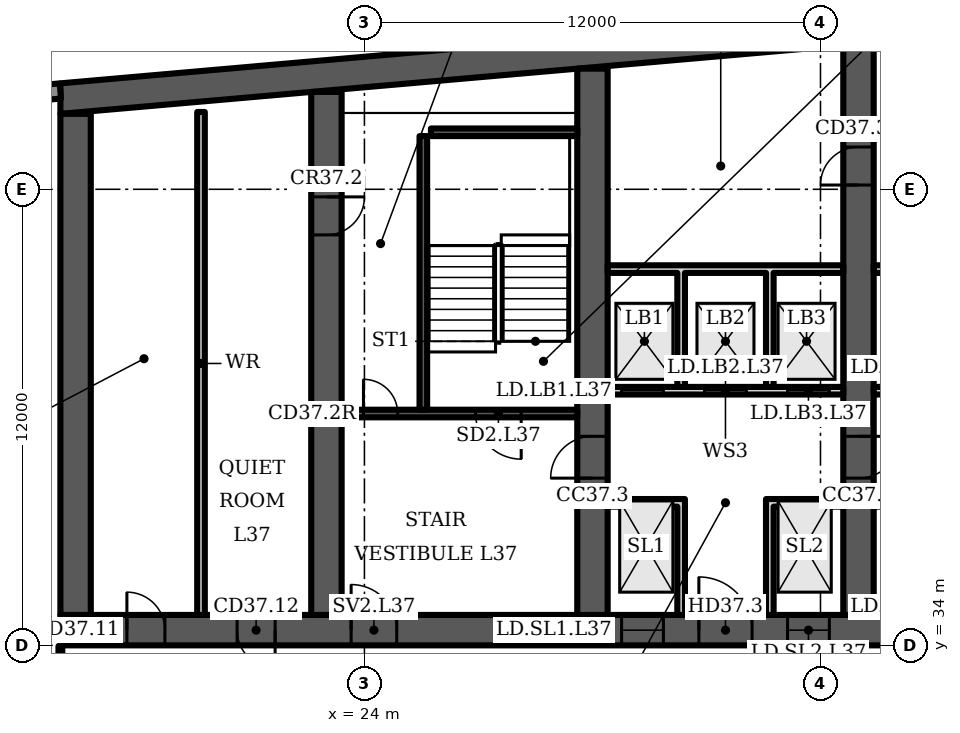
"""IFC4 building model, lengths in metres.
Left out: names, types, materials, properties, quantities, classifications, styles, units other than length and angle.
Written with IfcOpenShell. Run it as: python <this file> out.ifc"""

import sys

from ifc_helpers import new_model, si_unit, direction, frame, frame_2d, origin, place, context, subcontext, project, spatial, polyline, rectangle, outline, extrude, element, fill, save


model = new_model("IFC4")
c1 = context("Model", 3, precision=1e-05, world=origin(), true_north=direction((0.0, 1.0)))
c2 = subcontext(c1, "Body", "Model", "MODEL_VIEW")
j1 = project(units=[si_unit("LENGTHUNIT", "METRE"), si_unit("PLANEANGLEUNIT", "RADIAN")], contexts=[c1])
p1 = place(None, origin())
s1 = spatial("IfcSite", under=j1, at=p1, CompositionType="ELEMENT")
p2 = place(p1, origin())
s2 = spatial("IfcBuilding", under=s1, at=p2, CompositionType="ELEMENT")
p3 = place(p2, frame((0.0, 0.0, 155.5)))
s3 = spatial("IfcBuildingStorey", under=s2, at=p3, CompositionType="ELEMENT", Elevation=155.5)
p4 = place(p3, origin())
e1 = element("IfcWall", 1, at=p4, inside=s3, PredefinedType="SHEAR", context=c2, shape_type="SweptSolid", body=[
    extrude(outline(polyline([(16.0, 47.984), (37.0, 49.822), (58.0, 47.984), (58.0, 48.787), (37.0, 50.625), (16.0, 48.787), (16.0, 47.984)])), origin(), (0.0, 0.0, 1.0), 3.6),
])
p5 = place(p3, frame((16.0, 34.4, 0.0), z_axis=(0.0, 0.0, 1.0), x_axis=(1.0, 0.0, 0.0)))
e2 = element("IfcWall", 2, at=p5, inside=s3, PredefinedType="SHEAR", context=c2, shape_type="SweptSolid", body=[
    extrude(rectangle(XDim=42.0, YDim=0.8, at=frame_2d((21.0, 0.0))), origin(), (0.0, 0.0, 1.0), 3.6),
])
p6 = place(p5, frame((1.75, 0.0, 0.0)))
e3 = element("IfcOpeningElement", 3, at=p6, cuts=e2, PredefinedType="OPENING", context=c2, shape_type="SweptSolid", body=[
    extrude(rectangle(XDim=1.0, YDim=2.1, at=frame_2d((0.5, 1.05))), frame((0.0, 0.41, 0.0), z_axis=(0.0, -1.0, 0.0), x_axis=(1.0, 0.0, 0.0)), (0.0, 0.0, 1.0), 0.82),
])
p7 = place(p5, frame((4.65, 0.0, 0.0)))
e4 = element("IfcOpeningElement", 4, at=p7, cuts=e2, PredefinedType="OPENING", context=c2, shape_type="SweptSolid", body=[
    extrude(rectangle(XDim=1.0, YDim=2.1, at=frame_2d((0.5, 1.05))), frame((0.0, 0.41, 0.0), z_axis=(0.0, -1.0, 0.0), x_axis=(1.0, 0.0, 0.0)), (0.0, 0.0, 1.0), 0.82),
])
p8 = place(p5, frame((7.65, 0.0, 0.0)))
e5 = element("IfcOpeningElement", 5, at=p8, cuts=e2, PredefinedType="OPENING", context=c2, shape_type="SweptSolid", body=[
    extrude(rectangle(XDim=1.2, YDim=2.1, at=frame_2d((0.6, 1.05))), frame((0.0, 0.41, 0.0), z_axis=(0.0, -1.0, 0.0), x_axis=(1.0, 0.0, 0.0)), (0.0, 0.0, 1.0), 0.82),
])
p9 = place(p5, frame((14.767, 0.0, 0.0)))
e6 = element("IfcOpeningElement", 6, at=p9, cuts=e2, PredefinedType="OPENING", context=c2, shape_type="SweptSolid", body=[
    extrude(rectangle(XDim=1.1, YDim=2.1, at=frame_2d((0.55, 1.05))), frame((0.0, 0.41, 0.0), z_axis=(0.0, -1.0, 0.0), x_axis=(1.0, 0.0, 0.0)), (0.0, 0.0, 1.0), 0.82),
])
p10 = place(p5, frame((19.133, 0.0, 0.0)))
e7 = element("IfcOpeningElement", 7, at=p10, cuts=e2, PredefinedType="OPENING", context=c2, shape_type="SweptSolid", body=[
    extrude(rectangle(XDim=1.1, YDim=2.1, at=frame_2d((0.55, 1.05))), frame((0.0, 0.41, 0.0), z_axis=(0.0, -1.0, 0.0), x_axis=(1.0, 0.0, 0.0)), (0.0, 0.0, 1.0), 0.82),
])
p11 = place(p5, frame((16.8, 0.0, 0.0)))
e8 = element("IfcOpeningElement", 8, at=p11, cuts=e2, PredefinedType="OPENING", context=c2, shape_type="SweptSolid", body=[
    extrude(rectangle(XDim=1.4, YDim=2.1, at=frame_2d((0.7, 1.05))), frame((0.0, 0.41, 0.0), z_axis=(0.0, -1.0, 0.0), x_axis=(1.0, 0.0, 0.0)), (0.0, 0.0, 1.0), 0.82),
])
p12 = place(p5, frame((21.767, 0.0, 0.0)))
e9 = element("IfcOpeningElement", 9, at=p12, cuts=e2, PredefinedType="OPENING", context=c2, shape_type="SweptSolid", body=[
    extrude(rectangle(XDim=1.1, YDim=2.1, at=frame_2d((0.55, 1.05))), frame((0.0, 0.41, 0.0), z_axis=(0.0, -1.0, 0.0), x_axis=(1.0, 0.0, 0.0)), (0.0, 0.0, 1.0), 0.82),
])
p13 = place(p5, frame((23.95, 0.0, 0.0)))
e10 = element("IfcOpeningElement", 10, at=p13, cuts=e2, PredefinedType="OPENING", context=c2, shape_type="SweptSolid", body=[
    extrude(rectangle(XDim=1.1, YDim=2.1, at=frame_2d((0.55, 1.05))), frame((0.0, 0.41, 0.0), z_axis=(0.0, -1.0, 0.0), x_axis=(1.0, 0.0, 0.0)), (0.0, 0.0, 1.0), 0.82),
])
p14 = place(p5, frame((26.133, 0.0, 0.0)))
e11 = element("IfcOpeningElement", 11, at=p14, cuts=e2, PredefinedType="OPENING", context=c2, shape_type="SweptSolid", body=[
    extrude(rectangle(XDim=1.1, YDim=2.1, at=frame_2d((0.55, 1.05))), frame((0.0, 0.41, 0.0), z_axis=(0.0, -1.0, 0.0), x_axis=(1.0, 0.0, 0.0)), (0.0, 0.0, 1.0), 0.82),
])
p15 = place(p5, frame((33.15, 0.0, 0.0)))
e12 = element("IfcOpeningElement", 12, at=p15, cuts=e2, PredefinedType="OPENING", context=c2, shape_type="SweptSolid", body=[
    extrude(rectangle(XDim=1.2, YDim=2.1, at=frame_2d((0.6, 1.05))), frame((0.0, 0.41, 0.0), z_axis=(0.0, -1.0, 0.0), x_axis=(1.0, 0.0, 0.0)), (0.0, 0.0, 1.0), 0.82),
])
p16 = place(p5, frame((35.817, 0.0, 0.0)))
e13 = element("IfcOpeningElement", 13, at=p16, cuts=e2, PredefinedType="OPENING", context=c2, shape_type="SweptSolid", body=[
    extrude(rectangle(XDim=1.0, YDim=2.1, at=frame_2d((0.5, 1.05))), frame((0.0, 0.41, 0.0), z_axis=(0.0, -1.0, 0.0), x_axis=(1.0, 0.0, 0.0)), (0.0, 0.0, 1.0), 0.82),
])
p17 = place(p5, frame((39.95, 0.0, 0.0)))
e14 = element("IfcOpeningElement", 14, at=p17, cuts=e2, PredefinedType="OPENING", context=c2, shape_type="SweptSolid", body=[
    extrude(rectangle(XDim=1.0, YDim=2.1, at=frame_2d((0.5, 1.05))), frame((0.0, 0.41, 0.0), z_axis=(0.0, -1.0, 0.0), x_axis=(1.0, 0.0, 0.0)), (0.0, 0.0, 1.0), 0.82),
])
p18 = place(p5, frame((37.767, 0.0, 0.0)))
e15 = element("IfcOpeningElement", 15, at=p18, cuts=e2, PredefinedType="OPENING", context=c2, shape_type="SweptSolid", body=[
    extrude(rectangle(XDim=1.4, YDim=2.1, at=frame_2d((0.7, 1.05))), frame((0.0, 0.41, 0.0), z_axis=(0.0, -1.0, 0.0), x_axis=(1.0, 0.0, 0.0)), (0.0, 0.0, 1.0), 0.82),
])
p19 = place(p3, frame((16.4, 34.8, 0.0), z_axis=(0.0, 0.0, 1.0), x_axis=(0.0, 1.0, 0.0)))
e16 = element("IfcWall", 16, at=p19, inside=s3, PredefinedType="SHEAR", context=c2, shape_type="SweptSolid", body=[
    extrude(rectangle(XDim=13.184, YDim=0.8, at=frame_2d((6.592, 0.0))), origin(), (0.0, 0.0, 1.0), 3.6),
])
p20 = place(p3, frame((23.0, 34.8, 0.0), z_axis=(0.0, 0.0, 1.0), x_axis=(0.0, 1.0, 0.0)))
e17 = element("IfcWall", 17, at=p20, inside=s3, PredefinedType="SHEAR", context=c2, shape_type="SweptSolid", body=[
    extrude(rectangle(XDim=13.762, YDim=0.8, at=frame_2d((6.881, 0.0))), origin(), (0.0, 0.0, 1.0), 3.6),
])
p21 = place(p20, frame((10.0, 0.0, 0.0)))
e18 = element("IfcOpeningElement", 18, at=p21, cuts=e17, PredefinedType="OPENING", context=c2, shape_type="SweptSolid", body=[
    extrude(rectangle(XDim=1.0, YDim=2.1, at=frame_2d((0.5, 1.05))), frame((0.0, 0.41, 0.0), z_axis=(0.0, -1.0, 0.0), x_axis=(1.0, 0.0, 0.0)), (0.0, 0.0, 1.0), 0.82),
])
p22 = place(p3, frame((30.0, 34.8, 0.0), z_axis=(0.0, 0.0, 1.0), x_axis=(0.0, 1.0, 0.0)))
e19 = element("IfcWall", 19, at=p22, inside=s3, PredefinedType="SHEAR", context=c2, shape_type="SweptSolid", body=[
    extrude(rectangle(XDim=14.374, YDim=0.8, at=frame_2d((7.187, 0.0))), origin(), (0.0, 0.0, 1.0), 3.6),
])
p23 = place(p22, frame((3.6, 0.0, 0.0)))
e20 = element("IfcOpeningElement", 20, at=p23, cuts=e19, PredefinedType="OPENING", context=c2, shape_type="SweptSolid", body=[
    extrude(rectangle(XDim=1.1, YDim=2.1, at=frame_2d((0.55, 1.05))), frame((0.0, 0.41, 0.0), z_axis=(0.0, -1.0, 0.0), x_axis=(1.0, 0.0, 0.0)), (0.0, 0.0, 1.0), 0.82),
])
p24 = place(p3, frame((37.0, 34.8, 0.0), z_axis=(0.0, 0.0, 1.0), x_axis=(0.0, 1.0, 0.0)))
e21 = element("IfcWall", 21, at=p24, inside=s3, PredefinedType="SHEAR", context=c2, shape_type="SweptSolid", body=[
    extrude(rectangle(XDim=14.987, YDim=0.8, at=frame_2d((7.493, 0.0))), origin(), (0.0, 0.0, 1.0), 3.6),
])
p25 = place(p24, frame((11.312, 0.0, 0.0)))
e22 = element("IfcOpeningElement", 22, at=p25, cuts=e21, PredefinedType="OPENING", context=c2, shape_type="SweptSolid", body=[
    extrude(rectangle(XDim=1.0, YDim=2.1, at=frame_2d((0.5, 1.05))), frame((0.0, 0.41, 0.0), z_axis=(0.0, -1.0, 0.0), x_axis=(1.0, 0.0, 0.0)), (0.0, 0.0, 1.0), 0.82),
])
p26 = place(p24, frame((3.6, 0.0, 0.0)))
e23 = element("IfcOpeningElement", 23, at=p26, cuts=e21, PredefinedType="OPENING", context=c2, shape_type="SweptSolid", body=[
    extrude(rectangle(XDim=1.1, YDim=2.1, at=frame_2d((0.55, 1.05))), frame((0.0, 0.41, 0.0), z_axis=(0.0, -1.0, 0.0), x_axis=(1.0, 0.0, 0.0)), (0.0, 0.0, 1.0), 0.82),
])
p27 = place(p3, frame((16.0, 48.587, 0.0), z_axis=(0.0, 0.0, 1.0), x_axis=(-0.996194, -0.087168, 0.0)))
e24 = element("IfcWall", 24, at=p27, inside=s3, PredefinedType="SOLIDWALL", context=c2, shape_type="SweptSolid", body=[
    extrude(rectangle(XDim=2.994, YDim=0.4, at=frame_2d((1.497, 0.0))), origin(), (0.0, 0.0, 1.0), 3.2),
])
p28 = place(p3, frame((19.7, 34.8, 0.0), z_axis=(0.0, 0.0, 1.0), x_axis=(0.0, 1.0, 0.0)))
e25 = element("IfcWall", 25, at=p28, inside=s3, PredefinedType="PARTITIONING", context=c2, shape_type="SweptSolid", body=[
    extrude(rectangle(XDim=13.234, YDim=0.2, at=frame_2d((6.617, 0.0))), origin(), (0.0, 0.0, 1.0), 3.2),
])
p29 = place(p3, frame((23.4, 40.1, 0.0), z_axis=(0.0, 0.0, 1.0), x_axis=(1.0, 0.0, 0.0)))
e26 = element("IfcWall", 26, at=p29, inside=s3, PredefinedType="SHEAR", context=c2, shape_type="SweptSolid", body=[
    extrude(rectangle(XDim=6.2, YDim=0.2, at=frame_2d((3.1, 0.0))), origin(), (0.0, 0.0, 1.0), 3.2),
])
p30 = place(p29, frame((3.525, 0.0, 0.0)))
e27 = element("IfcOpeningElement", 27, at=p30, cuts=e26, PredefinedType="OPENING", context=c2, shape_type="SweptSolid", body=[
    extrude(rectangle(XDim=1.2, YDim=2.1, at=frame_2d((0.6, 1.05))), frame((0.0, 0.11, 0.0), z_axis=(0.0, -1.0, 0.0), x_axis=(1.0, 0.0, 0.0)), (0.0, 0.0, 1.0), 0.22),
])
p31 = place(p29, frame((0.575, 0.0, 0.0)))
e28 = element("IfcOpeningElement", 28, at=p31, cuts=e26, PredefinedType="OPENING", context=c2, shape_type="SweptSolid", body=[
    extrude(rectangle(XDim=0.9, YDim=2.1, at=frame_2d((0.45, 1.05))), frame((0.0, 0.11, 0.0), z_axis=(0.0, -1.0, 0.0), x_axis=(1.0, 0.0, 0.0)), (0.0, 0.0, 1.0), 0.22),
])
p32 = place(p3, frame((25.55, 40.2, 0.0), z_axis=(0.0, 0.0, 1.0), x_axis=(0.0, 1.0, 0.0)))
e29 = element("IfcWall", 29, at=p32, inside=s3, PredefinedType="SHEAR", context=c2, shape_type="SweptSolid", body=[
    extrude(rectangle(XDim=7.2, YDim=0.2, at=frame_2d((3.6, 0.0))), origin(), (0.0, 0.0, 1.0), 3.2),
])
p33 = place(p3, frame((25.75, 47.5, 0.0), z_axis=(0.0, 0.0, 1.0), x_axis=(1.0, 0.0, 0.0)))
e30 = element("IfcWall", 30, at=p33, inside=s3, PredefinedType="SHEAR", context=c2, shape_type="SweptSolid", body=[
    extrude(rectangle(XDim=3.85, YDim=0.2, at=frame_2d((1.925, 0.0))), origin(), (0.0, 0.0, 1.0), 3.2),
])
p34 = place(p3, frame((30.4, 40.7, 0.0), z_axis=(0.0, 0.0, 1.0), x_axis=(1.0, 0.0, 0.0)))
e31 = element("IfcWall", 31, at=p34, inside=s3, PredefinedType="PARTITIONING", context=c2, shape_type="SweptSolid", body=[
    extrude(rectangle(XDim=6.2, YDim=0.2, at=frame_2d((3.1, 0.0))), origin(), (0.0, 0.0, 1.0), 3.2),
])
p35 = place(p34, frame((0.367, 0.0, 0.0)))
e32 = element("IfcOpeningElement", 32, at=p35, cuts=e31, PredefinedType="OPENING", context=c2, shape_type="SweptSolid", body=[
    extrude(rectangle(XDim=1.1, YDim=2.1, at=frame_2d((0.55, 1.05))), frame((0.0, 0.11, 0.0), z_axis=(0.0, -1.0, 0.0), x_axis=(1.0, 0.0, 0.0)), (0.0, 0.0, 1.0), 0.22),
])
p36 = place(p34, frame((2.55, 0.0, 0.0)))
e33 = element("IfcOpeningElement", 33, at=p36, cuts=e31, PredefinedType="OPENING", context=c2, shape_type="SweptSolid", body=[
    extrude(rectangle(XDim=1.1, YDim=2.1, at=frame_2d((0.55, 1.05))), frame((0.0, 0.11, 0.0), z_axis=(0.0, -1.0, 0.0), x_axis=(1.0, 0.0, 0.0)), (0.0, 0.0, 1.0), 0.22),
])
p37 = place(p34, frame((4.733, 0.0, 0.0)))
e34 = element("IfcOpeningElement", 34, at=p37, cuts=e31, PredefinedType="OPENING", context=c2, shape_type="SweptSolid", body=[
    extrude(rectangle(XDim=1.1, YDim=2.1, at=frame_2d((0.55, 1.05))), frame((0.0, 0.11, 0.0), z_axis=(0.0, -1.0, 0.0), x_axis=(1.0, 0.0, 0.0)), (0.0, 0.0, 1.0), 0.22),
])
p38 = place(p3, frame((0.0, 0.0, -0.0)))
e35 = element("IfcWall", 35, at=p38, inside=s3, PredefinedType="PARTITIONING", context=c2, shape_type="SweptSolid", body=[
    extrude(outline(polyline([(32.233, 37.65), (30.4, 37.65), (30.4, 37.85), (32.233, 37.85), (32.433, 37.85), (32.433, 34.8), (32.233, 34.8), (32.233, 37.65)])), origin(), (0.0, 0.0, 1.0), 3.2),
])
p39 = place(p3, frame((0.0, 0.0, -0.0)))
e36 = element("IfcWall", 36, at=p39, inside=s3, PredefinedType="PARTITIONING", context=c2, shape_type="SweptSolid", body=[
    extrude(outline(polyline([(34.567, 37.85), (34.767, 37.85), (36.6, 37.85), (36.6, 37.65), (34.767, 37.65), (34.767, 34.8), (34.567, 34.8), (34.567, 37.85)])), origin(), (0.0, 0.0, 1.0), 3.2),
])
p40 = place(p3, frame((0.0, 0.0, -0.0)))
e37 = element("IfcWall", 37, at=p40, inside=s3, PredefinedType="PARTITIONING", context=c2, shape_type="SweptSolid", body=[
    extrude(outline(polyline([(32.433, 40.8), (32.233, 40.8), (32.233, 43.8), (30.4, 43.8), (30.4, 44.0), (36.6, 44.0), (36.6, 43.8), (34.767, 43.8), (34.767, 40.8), (34.567, 40.8), (34.567, 43.8), (32.433, 43.8), (32.433, 40.8)])), origin(), (0.0, 0.0, 1.0), 3.2),
])
p41 = place(p3, frame((37.4, 40.7, 0.0), z_axis=(0.0, 0.0, 1.0), x_axis=(1.0, 0.0, 0.0)))
e38 = element("IfcWall", 38, at=p41, inside=s3, PredefinedType="PARTITIONING", context=c2, shape_type="SweptSolid", body=[
    extrude(rectangle(XDim=6.2, YDim=0.2, at=frame_2d((3.1, 0.0))), origin(), (0.0, 0.0, 1.0), 3.2),
])
p42 = place(p41, frame((0.367, 0.0, 0.0)))
e39 = element("IfcOpeningElement", 39, at=p42, cuts=e38, PredefinedType="OPENING", context=c2, shape_type="SweptSolid", body=[
    extrude(rectangle(XDim=1.1, YDim=2.1, at=frame_2d((0.55, 1.05))), frame((0.0, 0.11, 0.0), z_axis=(0.0, -1.0, 0.0), x_axis=(1.0, 0.0, 0.0)), (0.0, 0.0, 1.0), 0.22),
])
p43 = place(p41, frame((2.55, 0.0, 0.0)))
e40 = element("IfcOpeningElement", 40, at=p43, cuts=e38, PredefinedType="OPENING", context=c2, shape_type="SweptSolid", body=[
    extrude(rectangle(XDim=1.1, YDim=2.1, at=frame_2d((0.55, 1.05))), frame((0.0, 0.11, 0.0), z_axis=(0.0, -1.0, 0.0), x_axis=(1.0, 0.0, 0.0)), (0.0, 0.0, 1.0), 0.22),
])
p44 = place(p41, frame((4.733, 0.0, 0.0)))
e41 = element("IfcOpeningElement", 41, at=p44, cuts=e38, PredefinedType="OPENING", context=c2, shape_type="SweptSolid", body=[
    extrude(rectangle(XDim=1.1, YDim=2.1, at=frame_2d((0.55, 1.05))), frame((0.0, 0.11, 0.0), z_axis=(0.0, -1.0, 0.0), x_axis=(1.0, 0.0, 0.0)), (0.0, 0.0, 1.0), 0.22),
])
p45 = place(p3, frame((0.0, 0.0, -0.0)))
e42 = element("IfcWall", 42, at=p45, inside=s3, PredefinedType="PARTITIONING", context=c2, shape_type="SweptSolid", body=[
    extrude(outline(polyline([(41.567, 37.1), (39.433, 37.1), (39.433, 34.8), (39.233, 34.8), (39.233, 37.65), (37.4, 37.65), (37.4, 37.85), (39.233, 37.85), (39.433, 37.85), (39.433, 37.3), (41.567, 37.3), (41.567, 37.55), (41.767, 37.55), (43.6, 37.55), (43.6, 37.35), (41.767, 37.35), (41.767, 34.8), (41.567, 34.8), (41.567, 37.1)])), origin(), (0.0, 0.0, 1.0), 3.2),
])
p46 = place(p3, frame((0.0, 0.0, -0.0)))
e43 = element("IfcWall", 43, at=p46, inside=s3, PredefinedType="PARTITIONING", context=c2, shape_type="SweptSolid", body=[
    extrude(outline(polyline([(39.433, 40.8), (39.233, 40.8), (39.233, 43.8), (37.4, 43.8), (37.4, 44.0), (43.6, 44.0), (43.6, 43.8), (41.767, 43.8), (41.767, 40.8), (41.567, 40.8), (41.567, 43.8), (39.433, 43.8), (39.433, 40.8)])), origin(), (0.0, 0.0, 1.0), 3.2),
])
p47 = place(p3, frame((37.0, 30.5, 0.0), z_axis=(0.0, 0.0, 1.0), x_axis=(0.0, 1.0, 0.0)))
e44 = element("IfcWall", 44, at=p47, inside=s3, PredefinedType="PARTITIONING", context=c2, shape_type="SweptSolid", body=[
    extrude(rectangle(XDim=3.5, YDim=0.2, at=frame_2d((1.75, 0.0))), origin(), (0.0, 0.0, 1.0), 3.2),
])
p48 = place(p47, frame((1.2, 0.0, 0.0)))
e45 = element("IfcOpeningElement", 45, at=p48, cuts=e44, PredefinedType="OPENING", context=c2, shape_type="SweptSolid", body=[
    extrude(rectangle(XDim=1.1, YDim=2.1, at=frame_2d((0.55, 1.05))), frame((0.0, 0.11, 0.0), z_axis=(0.0, -1.0, 0.0), x_axis=(1.0, 0.0, 0.0)), (0.0, 0.0, 1.0), 0.22),
])
p49 = place(p3, frame((16.0, 30.5, 0.0), z_axis=(0.0, 0.0, 1.0), x_axis=(0.0, 1.0, 0.0)))
e46 = element("IfcWall", 46, at=p49, inside=s3, PredefinedType="PARTITIONING", context=c2, shape_type="SweptSolid", body=[
    extrude(rectangle(XDim=3.48, YDim=0.1, at=frame_2d((1.74, 0.0))), origin(), (0.0, 0.0, 1.0), 3.2),
])
p50 = place(p6, origin())
e47 = element("IfcDoor", 47, at=p50, inside=s3, OperationType="SINGLE_SWING_LEFT", PredefinedType="DOOR", context=c2, shape_type="SweptSolid", body=[
    extrude(rectangle(XDim=1.0, YDim=2.1, at=frame_2d((0.5, 1.05))), frame((0.0, 0.4, 0.0), z_axis=(0.0, -1.0, 0.0), x_axis=(1.0, 0.0, 0.0)), (0.0, 0.0, 1.0), 0.8),
])
fill(e3, e47)
p51 = place(p7, origin())
e48 = element("IfcDoor", 48, at=p51, inside=s3, OperationType="SINGLE_SWING_RIGHT", PredefinedType="DOOR", context=c2, shape_type="SweptSolid", body=[
    extrude(rectangle(XDim=1.0, YDim=2.1, at=frame_2d((0.5, 1.05))), frame((0.0, 0.4, 0.0), z_axis=(0.0, -1.0, 0.0), x_axis=(1.0, 0.0, 0.0)), (0.0, 0.0, 1.0), 0.8),
])
fill(e4, e48)
p52 = place(p30, origin())
e49 = element("IfcDoor", 49, at=p52, inside=s3, OperationType="SINGLE_SWING_RIGHT", PredefinedType="DOOR", context=c2, shape_type="SweptSolid", body=[
    extrude(rectangle(XDim=1.2, YDim=2.1, at=frame_2d((0.6, 1.05))), frame((0.0, 0.025, 0.0), z_axis=(0.0, -1.0, 0.0), x_axis=(1.0, 0.0, 0.0)), (0.0, 0.0, 1.0), 0.05),
])
fill(e27, e49)
p53 = place(p31, origin())
e50 = element("IfcDoor", 50, at=p53, inside=s3, OperationType="SINGLE_SWING_LEFT", PredefinedType="DOOR", context=c2, shape_type="SweptSolid", body=[
    extrude(rectangle(XDim=0.9, YDim=2.1, at=frame_2d((0.45, 1.05))), frame((0.0, 0.025, 0.0), z_axis=(0.0, -1.0, 0.0), x_axis=(1.0, 0.0, 0.0)), (0.0, 0.0, 1.0), 0.05),
])
fill(e28, e50)
p54 = place(p8, origin())
e51 = element("IfcDoor", 51, at=p54, inside=s3, OperationType="SINGLE_SWING_LEFT", PredefinedType="DOOR", context=c2, shape_type="SweptSolid", body=[
    extrude(rectangle(XDim=1.2, YDim=2.1, at=frame_2d((0.6, 1.05))), frame((0.0, 0.025, 0.0), z_axis=(0.0, -1.0, 0.0), x_axis=(1.0, 0.0, 0.0)), (0.0, 0.0, 1.0), 0.05),
])
fill(e5, e51)
p55 = place(p9, origin())
e52 = element("IfcDoor", 52, at=p55, inside=s3, OperationType="DOUBLE_DOOR_SLIDING", PredefinedType="DOOR", context=c2, shape_type="SweptSolid", body=[
    extrude(rectangle(XDim=1.1, YDim=2.1, at=frame_2d((0.55, 1.05))), frame((0.0, 0.025, 0.0), z_axis=(0.0, -1.0, 0.0), x_axis=(1.0, 0.0, 0.0)), (0.0, 0.0, 1.0), 0.05),
])
fill(e6, e52)
p56 = place(p10, origin())
e53 = element("IfcDoor", 53, at=p56, inside=s3, OperationType="DOUBLE_DOOR_SLIDING", PredefinedType="DOOR", context=c2, shape_type="SweptSolid", body=[
    extrude(rectangle(XDim=1.1, YDim=2.1, at=frame_2d((0.55, 1.05))), frame((0.0, 0.025, 0.0), z_axis=(0.0, -1.0, 0.0), x_axis=(1.0, 0.0, 0.0)), (0.0, 0.0, 1.0), 0.05),
])
fill(e7, e53)
p57 = place(p11, origin())
e54 = element("IfcDoor", 54, at=p57, inside=s3, OperationType="DOUBLE_DOOR_SINGLE_SWING", PredefinedType="DOOR", context=c2, shape_type="SweptSolid", body=[
    extrude(rectangle(XDim=1.4, YDim=2.1, at=frame_2d((0.7, 1.05))), frame((0.0, 0.025, 0.0), z_axis=(0.0, -1.0, 0.0), x_axis=(1.0, 0.0, 0.0)), (0.0, 0.0, 1.0), 0.05),
])
fill(e8, e54)
p58 = place(p35, origin())
e55 = element("IfcDoor", 55, at=p58, inside=s3, OperationType="DOUBLE_DOOR_SLIDING", PredefinedType="DOOR", context=c2, shape_type="SweptSolid", body=[
    extrude(rectangle(XDim=1.1, YDim=2.1, at=frame_2d((0.55, 1.05))), frame((0.0, 0.025, 0.0), z_axis=(0.0, -1.0, 0.0), x_axis=(1.0, 0.0, 0.0)), (0.0, 0.0, 1.0), 0.05),
])
fill(e32, e55)
p59 = place(p36, origin())
e56 = element("IfcDoor", 56, at=p59, inside=s3, OperationType="DOUBLE_DOOR_SLIDING", PredefinedType="DOOR", context=c2, shape_type="SweptSolid", body=[
    extrude(rectangle(XDim=1.1, YDim=2.1, at=frame_2d((0.55, 1.05))), frame((0.0, 0.025, 0.0), z_axis=(0.0, -1.0, 0.0), x_axis=(1.0, 0.0, 0.0)), (0.0, 0.0, 1.0), 0.05),
])
fill(e33, e56)
p60 = place(p37, origin())
e57 = element("IfcDoor", 57, at=p60, inside=s3, OperationType="DOUBLE_DOOR_SLIDING", PredefinedType="DOOR", context=c2, shape_type="SweptSolid", body=[
    extrude(rectangle(XDim=1.1, YDim=2.1, at=frame_2d((0.55, 1.05))), frame((0.0, 0.025, 0.0), z_axis=(0.0, -1.0, 0.0), x_axis=(1.0, 0.0, 0.0)), (0.0, 0.0, 1.0), 0.05),
])
fill(e34, e57)
p61 = place(p25, origin())
e58 = element("IfcDoor", 58, at=p61, inside=s3, OperationType="SINGLE_SWING_LEFT", PredefinedType="DOOR", context=c2, shape_type="SweptSolid", body=[
    extrude(rectangle(XDim=1.0, YDim=2.1, at=frame_2d((0.5, 1.05))), frame((0.0, 0.4, 0.0), z_axis=(0.0, -1.0, 0.0), x_axis=(1.0, 0.0, 0.0)), (0.0, 0.0, 1.0), 0.8),
])
fill(e22, e58)
p62 = place(p21, origin())
e59 = element("IfcDoor", 59, at=p62, inside=s3, OperationType="SINGLE_SWING_RIGHT", PredefinedType="DOOR", context=c2, shape_type="SweptSolid", body=[
    extrude(rectangle(XDim=1.0, YDim=2.1, at=frame_2d((0.5, 1.05))), frame((0.0, 0.4, 0.0), z_axis=(0.0, -1.0, 0.0), x_axis=(1.0, 0.0, 0.0)), (0.0, 0.0, 1.0), 0.8),
])
fill(e18, e59)
p63 = place(p23, origin())
e60 = element("IfcDoor", 60, at=p63, inside=s3, OperationType="SINGLE_SWING_LEFT", PredefinedType="DOOR", context=c2, shape_type="SweptSolid", body=[
    extrude(rectangle(XDim=1.1, YDim=2.1, at=frame_2d((0.55, 1.05))), frame((0.0, 0.025, 0.0), z_axis=(0.0, -1.0, 0.0), x_axis=(1.0, 0.0, 0.0)), (0.0, 0.0, 1.0), 0.05),
])
fill(e20, e60)
p64 = place(p26, origin())
e61 = element("IfcDoor", 61, at=p64, inside=s3, OperationType="SINGLE_SWING_RIGHT", PredefinedType="DOOR", context=c2, shape_type="SweptSolid", body=[
    extrude(rectangle(XDim=1.1, YDim=2.1, at=frame_2d((0.55, 1.05))), frame((0.0, 0.025, 0.0), z_axis=(0.0, -1.0, 0.0), x_axis=(1.0, 0.0, 0.0)), (0.0, 0.0, 1.0), 0.05),
])
fill(e23, e61)
save(model, sys.argv[1])
